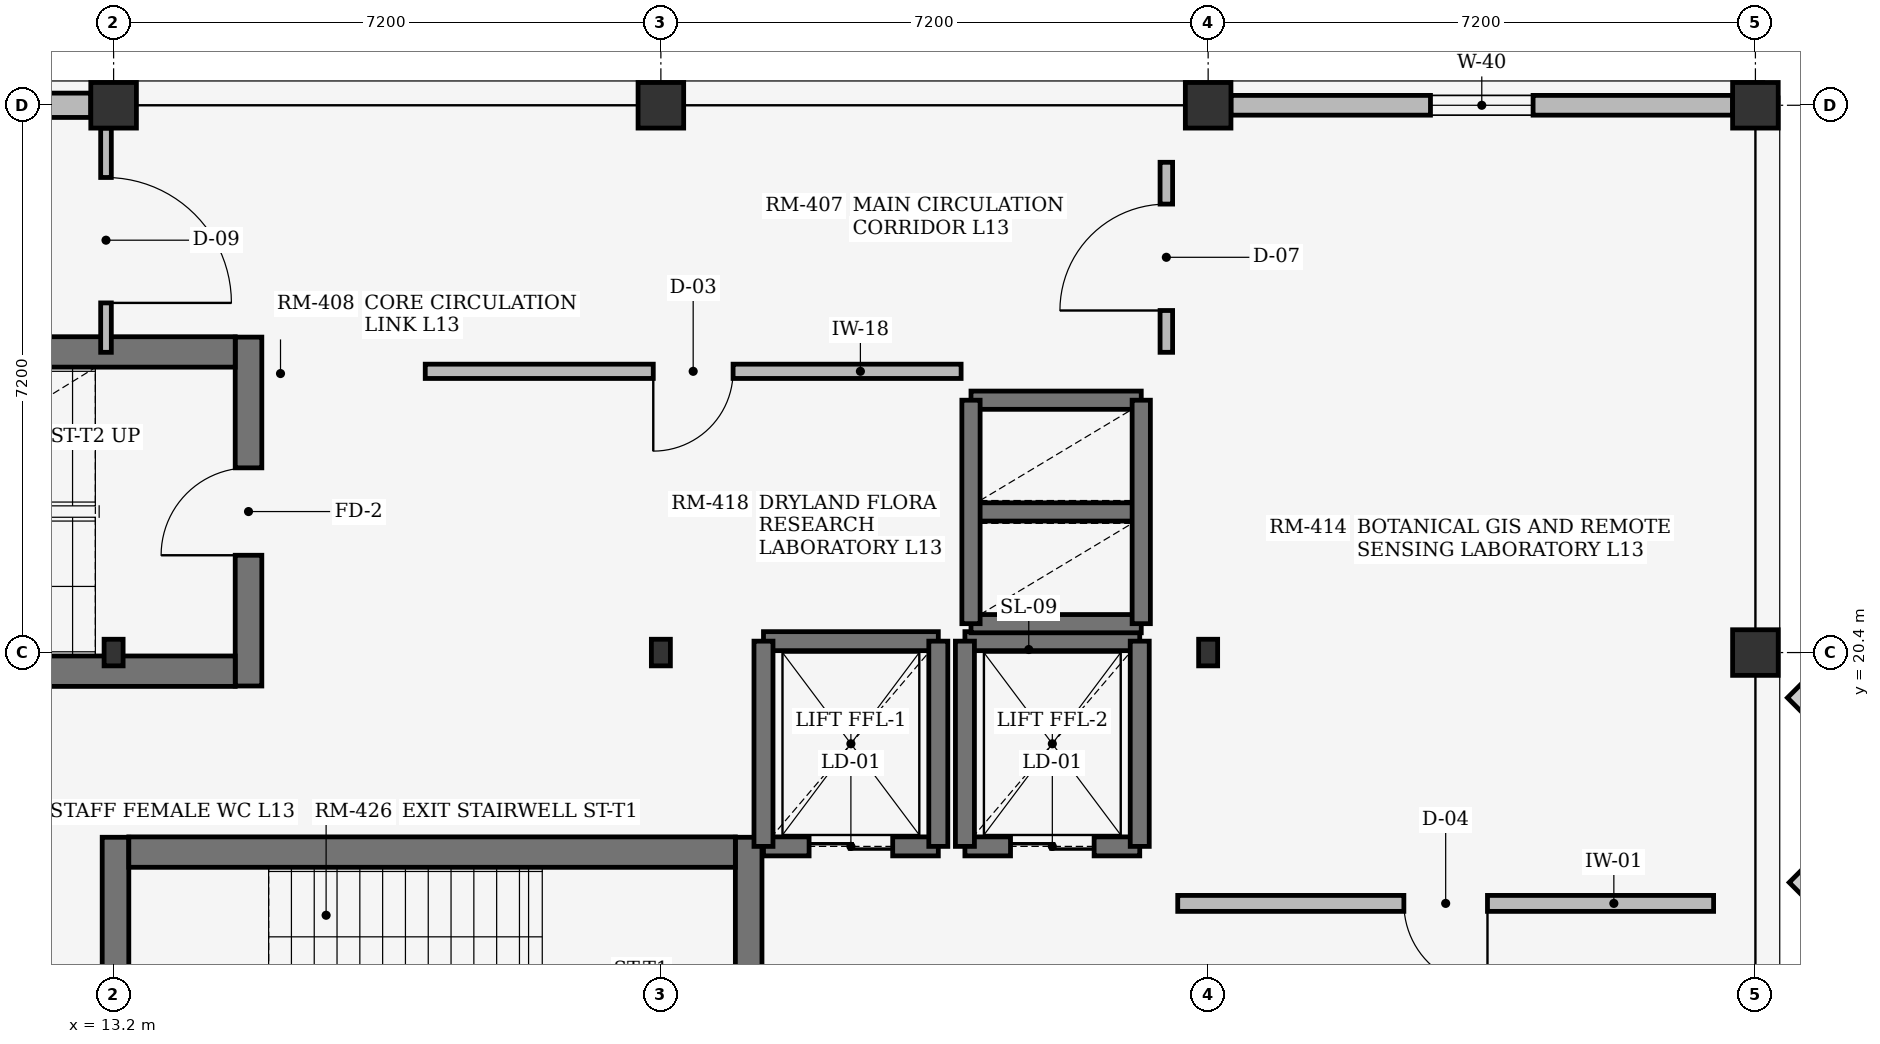
"""IFC4 building model, lengths in metres.
Left out: names, types, materials, properties, quantities, classifications, styles, units other than length and angle.
Written with IfcOpenShell. Run it as: python <this file> out.ifc"""

import sys

from ifc_helpers import new_model, si_unit, direction, frame, frame_2d, origin, origin_2d, place, context, subcontext, project, spatial, rectangle, i_section, extrude, element, fill, save


model = new_model("IFC4")
c1 = context("Model", 3, precision=1e-05, world=origin(), true_north=direction((0.0, 1.0)))
c2 = subcontext(c1, "Body", "Model", "MODEL_VIEW")
j1 = project(units=[si_unit("LENGTHUNIT", "METRE"), si_unit("PLANEANGLEUNIT", "RADIAN")], contexts=[c1])
p1 = place(None, origin())
s1 = spatial("IfcSite", under=j1, at=p1, CompositionType="ELEMENT")
p2 = place(p1, origin())
s2 = spatial("IfcBuilding", under=s1, at=p2, CompositionType="ELEMENT")
p3 = place(p2, frame((0.0, 0.0, 52.2)))
s3 = spatial("IfcBuildingStorey", under=s2, at=p3, CompositionType="ELEMENT", Elevation=52.2)
p4 = place(p3, frame((13.2, 20.4, 0.0), z_axis=(0.0, 0.0, 1.0), x_axis=(1.0, 0.0, 0.0)))
e1 = element("IfcColumn", 1, at=p4, inside=s3, PredefinedType="COLUMN", context=c2, shape_type="SweptSolid", body=[
    extrude(i_section(OverallWidth=0.25, OverallDepth=0.35, WebThickness=0.01, FlangeThickness=0.012, at=origin_2d()), origin(), (0.0, 0.0, 1.0), 3.705),
])
p5 = place(p3, frame((13.2, 27.6, 0.0), z_axis=(0.0, 0.0, 1.0), x_axis=(1.0, 0.0, 0.0)))
e2 = element("IfcColumn", 2, at=p5, inside=s3, PredefinedType="COLUMN", context=c2, shape_type="SweptSolid", body=[
    extrude(rectangle(XDim=0.6, YDim=0.6, at=origin_2d()), origin(), (0.0, 0.0, 1.0), 3.705),
])
p6 = place(p3, frame((20.4, 20.4, 0.0), z_axis=(0.0, 0.0, 1.0), x_axis=(1.0, 0.0, 0.0)))
e3 = element("IfcColumn", 3, at=p6, inside=s3, PredefinedType="COLUMN", context=c2, shape_type="SweptSolid", body=[
    extrude(i_section(OverallWidth=0.25, OverallDepth=0.35, WebThickness=0.01, FlangeThickness=0.012, at=origin_2d()), origin(), (0.0, 0.0, 1.0), 3.705),
])
p7 = place(p3, frame((20.4, 27.6, 0.0), z_axis=(0.0, 0.0, 1.0), x_axis=(1.0, 0.0, 0.0)))
e4 = element("IfcColumn", 4, at=p7, inside=s3, PredefinedType="COLUMN", context=c2, shape_type="SweptSolid", body=[
    extrude(rectangle(XDim=0.6, YDim=0.6, at=origin_2d()), origin(), (0.0, 0.0, 1.0), 3.705),
])
p8 = place(p3, frame((27.6, 20.4, 0.0), z_axis=(0.0, 0.0, 1.0), x_axis=(1.0, 0.0, 0.0)))
e5 = element("IfcColumn", 5, at=p8, inside=s3, PredefinedType="COLUMN", context=c2, shape_type="SweptSolid", body=[
    extrude(i_section(OverallWidth=0.25, OverallDepth=0.35, WebThickness=0.01, FlangeThickness=0.012, at=origin_2d()), origin(), (0.0, 0.0, 1.0), 3.705),
])
for number, where, z_axis, x_axis in (
    (6, (27.6, 27.6, 0.0), (0.0, 0.0, 1.0), (1.0, 0.0, 0.0)),
    (7, (34.8, 20.4, 0.0), (0.0, 0.0, 1.0), (1.0, 0.0, 0.0)),
    (8, (34.8, 27.6, 0.0), (0.0, 0.0, 1.0), (1.0, 0.0, 0.0)),
):
    element("IfcColumn", number, at=place(p3, frame(where, z_axis=z_axis, x_axis=x_axis)), inside=s3, PredefinedType="COLUMN", context=c2, shape_type="SweptSolid", body=[
        extrude(rectangle(XDim=0.6, YDim=0.6, at=origin_2d()), origin(), (0.0, 0.0, 1.0), 3.705),
    ])
p9 = place(p3, frame((6.3, 27.6, 0.0), z_axis=(0.0, 0.0, 1.0), x_axis=(1.0, 0.0, 0.0)))
e9 = element("IfcWall", 9, at=p9, inside=s3, PredefinedType="STANDARD", context=c2, shape_type="SweptSolid", body=[
    extrude(rectangle(XDim=6.6, YDim=0.32, at=frame_2d((3.3, 0.0))), origin(), (0.0, 0.0, 1.0), 3.285),
])
p10 = place(p9, frame((2.15, 0.0, 0.75)))
e10 = element("IfcOpeningElement", 10, at=p10, cuts=e9, PredefinedType="OPENING", context=c2, shape_type="SweptSolid", body=[
    extrude(rectangle(XDim=2.3, YDim=1.35, at=frame_2d((1.15, 0.675))), frame((0.0, 0.17, 0.0), z_axis=(0.0, -1.0, 0.0), x_axis=(1.0, 0.0, 0.0)), (0.0, 0.0, 1.0), 0.34),
])
p11 = place(p3, frame((27.9, 27.6, 0.0), z_axis=(0.0, 0.0, 1.0), x_axis=(1.0, 0.0, 0.0)))
e11 = element("IfcWall", 11, at=p11, inside=s3, PredefinedType="STANDARD", context=c2, shape_type="SweptSolid", body=[
    extrude(rectangle(XDim=6.6, YDim=0.26, at=frame_2d((3.3, 0.0))), origin(), (0.0, 0.0, 1.0), 3.285),
])
p12 = place(p11, frame((2.625, 0.0, 0.75)))
e12 = element("IfcOpeningElement", 12, at=p12, cuts=e11, PredefinedType="OPENING", context=c2, shape_type="SweptSolid", body=[
    extrude(rectangle(XDim=1.35, YDim=1.5, at=frame_2d((0.675, 0.75))), frame((0.0, 0.14, 0.0), z_axis=(0.0, -1.0, 0.0), x_axis=(1.0, 0.0, 0.0)), (0.0, 0.0, 1.0), 0.28),
])
p13 = place(p3, frame((13.225, 13.0, 0.0), z_axis=(0.0, 0.0, 1.0), x_axis=(0.0, 1.0, 0.0)))
e13 = element("IfcWall", 13, at=p13, inside=s3, PredefinedType="SHEAR", context=c2, shape_type="SweptSolid", body=[
    extrude(rectangle(XDim=4.97, YDim=0.35, at=frame_2d((2.485, 0.0))), origin(), (0.0, 0.0, 1.0), 3.705),
])
p14 = place(p13, frame((1.86, 0.0, 0.0)))
e14 = element("IfcOpeningElement", 14, at=p14, cuts=e13, PredefinedType="OPENING", context=c2, shape_type="SweptSolid", body=[
    extrude(rectangle(XDim=1.25, YDim=2.2, at=frame_2d((0.625, 1.1))), frame((0.0, 0.185, 0.0), z_axis=(0.0, -1.0, 0.0), x_axis=(1.0, 0.0, 0.0)), (0.0, 0.0, 1.0), 0.37),
])
p15 = place(p3, frame((21.555, 13.38, 0.0), z_axis=(0.0, 0.0, 1.0), x_axis=(0.0, 1.0, 0.0)))
e15 = element("IfcWall", 15, at=p15, inside=s3, PredefinedType="SHEAR", context=c2, shape_type="SweptSolid", body=[
    extrude(rectangle(XDim=4.59, YDim=0.35, at=frame_2d((2.295, 0.0))), origin(), (0.0, 0.0, 1.0), 3.705),
])
p16 = place(p3, frame((13.4, 17.775, 0.0), z_axis=(0.0, 0.0, 1.0), x_axis=(1.0, 0.0, 0.0)))
e16 = element("IfcWall", 16, at=p16, inside=s3, PredefinedType="SHEAR", context=c2, shape_type="SweptSolid", body=[
    extrude(rectangle(XDim=7.98, YDim=0.4, at=frame_2d((3.99, 0.0))), origin(), (0.0, 0.0, 1.0), 3.705),
])
p17 = place(p3, frame((14.975, 24.55, 0.0), z_axis=(0.0, 0.0, 1.0), x_axis=(0.0, -1.0, 0.0)))
e17 = element("IfcWall", 17, at=p17, inside=s3, PredefinedType="SHEAR", context=c2, shape_type="SweptSolid", body=[
    extrude(rectangle(XDim=4.59, YDim=0.35, at=frame_2d((2.295, 0.0))), origin(), (0.0, 0.0, 1.0), 3.705),
])
p18 = place(p17, frame((1.72, 0.0, 0.0)))
e18 = element("IfcOpeningElement", 18, at=p18, cuts=e17, PredefinedType="OPENING", context=c2, shape_type="SweptSolid", body=[
    extrude(rectangle(XDim=1.15, YDim=2.2, at=frame_2d((0.575, 1.1))), frame((0.0, 0.185, 0.0), z_axis=(0.0, -1.0, 0.0), x_axis=(1.0, 0.0, 0.0)), (0.0, 0.0, 1.0), 0.37),
])
for number, where, z_axis, x_axis in (
    (19, (14.8, 24.355, 0.0), (0.0, 0.0, 1.0), (-1.0, 0.0, 0.0)),
    (20, (14.8, 20.155, 0.0), (0.0, 0.0, 1.0), (-1.0, 0.0, 0.0)),
):
    element("IfcWall", number, at=place(p3, frame(where, z_axis=z_axis, x_axis=x_axis)), inside=s3, PredefinedType="SHEAR", context=c2, shape_type="SweptSolid", body=[
        extrude(rectangle(XDim=7.98, YDim=0.4, at=frame_2d((3.99, 0.0))), origin(), (0.0, 0.0, 1.0), 3.705),
    ])
p19 = place(p3, frame((21.75, 17.85, 0.0), z_axis=(0.0, 0.0, 1.0), x_axis=(1.0, 0.0, 0.0)))
e21 = element("IfcWall", 21, at=p19, inside=s3, PredefinedType="SHEAR", context=c2, shape_type="SweptSolid", body=[
    extrude(rectangle(XDim=2.3, YDim=0.25, at=frame_2d((1.15, 0.0))), origin(), (0.0, 0.0, 1.0), 3.705),
])
p20 = place(p19, frame((0.6, 0.0, 0.0)))
e22 = element("IfcOpeningElement", 22, at=p20, cuts=e21, PredefinedType="OPENING", context=c2, shape_type="SweptSolid", body=[
    extrude(rectangle(XDim=1.1, YDim=2.2, at=frame_2d((0.55, 1.1))), frame((0.0, 0.135, 0.0), z_axis=(0.0, -1.0, 0.0), x_axis=(1.0, 0.0, 0.0)), (0.0, 0.0, 1.0), 0.27),
])
p21 = place(p3, frame((21.75, 20.55, 0.0), z_axis=(0.0, 0.0, 1.0), x_axis=(1.0, 0.0, 0.0)))
e23 = element("IfcWall", 23, at=p21, inside=s3, PredefinedType="SHEAR", context=c2, shape_type="SweptSolid", body=[
    extrude(rectangle(XDim=2.3, YDim=0.25, at=frame_2d((1.15, 0.0))), origin(), (0.0, 0.0, 1.0), 3.705),
])
for number, where, z_axis, x_axis in (
    (24, (21.75, 17.85, 0.0), (0.0, 0.0, 1.0), (0.0, 1.0, 0.0)),
    (25, (24.05, 17.85, 0.0), (0.0, 0.0, 1.0), (0.0, 1.0, 0.0)),
):
    element("IfcWall", number, at=place(p3, frame(where, z_axis=z_axis, x_axis=x_axis)), inside=s3, PredefinedType="SHEAR", context=c2, shape_type="SweptSolid", body=[
        extrude(rectangle(XDim=2.7, YDim=0.25, at=frame_2d((1.35, 0.0))), origin(), (0.0, 0.0, 1.0), 3.705),
    ])
p22 = place(p3, frame((24.4, 17.85, 0.0), z_axis=(0.0, 0.0, 1.0), x_axis=(1.0, 0.0, 0.0)))
e26 = element("IfcWall", 26, at=p22, inside=s3, PredefinedType="SHEAR", context=c2, shape_type="SweptSolid", body=[
    extrude(rectangle(XDim=2.3, YDim=0.25, at=frame_2d((1.15, 0.0))), origin(), (0.0, 0.0, 1.0), 3.705),
])
p23 = place(p22, frame((0.6, 0.0, 0.0)))
e27 = element("IfcOpeningElement", 27, at=p23, cuts=e26, PredefinedType="OPENING", context=c2, shape_type="SweptSolid", body=[
    extrude(rectangle(XDim=1.1, YDim=2.2, at=frame_2d((0.55, 1.1))), frame((0.0, 0.135, 0.0), z_axis=(0.0, -1.0, 0.0), x_axis=(1.0, 0.0, 0.0)), (0.0, 0.0, 1.0), 0.27),
])
p24 = place(p3, frame((24.4, 20.55, 0.0), z_axis=(0.0, 0.0, 1.0), x_axis=(1.0, 0.0, 0.0)))
e28 = element("IfcWall", 28, at=p24, inside=s3, PredefinedType="SHEAR", context=c2, shape_type="SweptSolid", body=[
    extrude(rectangle(XDim=2.3, YDim=0.25, at=frame_2d((1.15, 0.0))), origin(), (0.0, 0.0, 1.0), 3.705),
])
for number, where, z_axis, x_axis in (
    (29, (24.4, 17.85, 0.0), (0.0, 0.0, 1.0), (0.0, 1.0, 0.0)),
    (30, (26.7, 17.85, 0.0), (0.0, 0.0, 1.0), (0.0, 1.0, 0.0)),
):
    element("IfcWall", number, at=place(p3, frame(where, z_axis=z_axis, x_axis=x_axis)), inside=s3, PredefinedType="SHEAR", context=c2, shape_type="SweptSolid", body=[
        extrude(rectangle(XDim=2.7, YDim=0.25, at=frame_2d((1.35, 0.0))), origin(), (0.0, 0.0, 1.0), 3.705),
    ])
for number, where, z_axis, x_axis in (
    (31, (24.48, 20.78, 0.0), (0.0, 0.0, 1.0), (1.0, 0.0, 0.0)),
    (32, (24.48, 22.25, 0.0), (0.0, 0.0, 1.0), (1.0, 0.0, 0.0)),
    (33, (24.48, 23.72, 0.0), (0.0, 0.0, 1.0), (1.0, 0.0, 0.0)),
):
    element("IfcWall", number, at=place(p3, frame(where, z_axis=z_axis, x_axis=x_axis)), inside=s3, PredefinedType="SHEAR", context=c2, shape_type="SweptSolid", body=[
        extrude(rectangle(XDim=2.24, YDim=0.24, at=frame_2d((1.12, 0.0))), origin(), (0.0, 0.0, 1.0), 3.705),
    ])
for number, where, z_axis, x_axis in (
    (34, (24.48, 20.78, 0.0), (0.0, 0.0, 1.0), (0.0, 1.0, 0.0)),
    (35, (26.72, 20.78, 0.0), (0.0, 0.0, 1.0), (0.0, 1.0, 0.0)),
):
    element("IfcWall", number, at=place(p3, frame(where, z_axis=z_axis, x_axis=x_axis)), inside=s3, PredefinedType="SHEAR", context=c2, shape_type="SweptSolid", body=[
        extrude(rectangle(XDim=2.94, YDim=0.24, at=frame_2d((1.47, 0.0))), origin(), (0.0, 0.0, 1.0), 3.705),
    ])
p25 = place(p3, frame((17.3, 24.1, 0.0), z_axis=(0.0, 0.0, 1.0), x_axis=(1.0, 0.0, 0.0)))
e36 = element("IfcWall", 36, at=p25, inside=s3, PredefinedType="PARTITIONING", context=c2, shape_type="SweptSolid", body=[
    extrude(rectangle(XDim=7.05, YDim=0.188, at=frame_2d((3.525, 0.0))), origin(), (0.0, 0.0, 1.0), 3.685),
])
p26 = place(p25, frame((3.0, 0.0, 0.0)))
e37 = element("IfcOpeningElement", 37, at=p26, cuts=e36, PredefinedType="OPENING", context=c2, shape_type="SweptSolid", body=[
    extrude(rectangle(XDim=1.05, YDim=2.15, at=frame_2d((0.525, 1.075))), frame((0.0, 0.104, 0.0), z_axis=(0.0, -1.0, 0.0), x_axis=(1.0, 0.0, 0.0)), (0.0, 0.0, 1.0), 0.208),
])
p27 = place(p3, frame((27.2, 17.1, 0.0), z_axis=(0.0, 0.0, 1.0), x_axis=(1.0, 0.0, 0.0)))
e38 = element("IfcWall", 38, at=p27, inside=s3, PredefinedType="PARTITIONING", context=c2, shape_type="SweptSolid", body=[
    extrude(rectangle(XDim=7.05, YDim=0.21, at=frame_2d((3.525, 0.0))), origin(), (0.0, 0.0, 1.0), 3.685),
])
p28 = place(p27, frame((2.975, 0.0, 0.0)))
e39 = element("IfcOpeningElement", 39, at=p28, cuts=e38, PredefinedType="OPENING", context=c2, shape_type="SweptSolid", body=[
    extrude(rectangle(XDim=1.1, YDim=2.2, at=frame_2d((0.55, 1.1))), frame((0.0, 0.115, 0.0), z_axis=(0.0, -1.0, 0.0), x_axis=(1.0, 0.0, 0.0)), (0.0, 0.0, 1.0), 0.23),
])
p29 = place(p3, frame((27.05, 24.35, 0.0), z_axis=(0.0, 0.0, 1.0), x_axis=(0.0, 1.0, 0.0)))
e40 = element("IfcWall", 40, at=p29, inside=s3, PredefinedType="PARTITIONING", context=c2, shape_type="SweptSolid", body=[
    extrude(rectangle(XDim=2.5, YDim=0.165, at=frame_2d((1.25, 0.0))), origin(), (0.0, 0.0, 1.0), 3.685),
])
p30 = place(p29, frame((0.55, 0.0, 0.0)))
e41 = element("IfcOpeningElement", 41, at=p30, cuts=e40, PredefinedType="OPENING", context=c2, shape_type="SweptSolid", body=[
    extrude(rectangle(XDim=1.4, YDim=2.25, at=frame_2d((0.7, 1.125))), frame((0.0, 0.093, 0.0), z_axis=(0.0, -1.0, 0.0), x_axis=(1.0, 0.0, 0.0)), (0.0, 0.0, 1.0), 0.185),
])
p31 = place(p3, frame((13.1, 24.35, 0.0), z_axis=(0.0, 0.0, 1.0), x_axis=(0.0, 1.0, 0.0)))
e42 = element("IfcWall", 42, at=p31, inside=s3, PredefinedType="PARTITIONING", context=c2, shape_type="SweptSolid", body=[
    extrude(rectangle(XDim=2.95, YDim=0.14, at=frame_2d((1.475, 0.0))), origin(), (0.0, 0.0, 1.0), 3.295),
])
p32 = place(p31, frame((0.65, 0.0, 0.0)))
e43 = element("IfcOpeningElement", 43, at=p32, cuts=e42, PredefinedType="OPENING", context=c2, shape_type="SweptSolid", body=[
    extrude(rectangle(XDim=1.65, YDim=2.25, at=frame_2d((0.825, 1.125))), frame((0.0, 0.08, 0.0), z_axis=(0.0, -1.0, 0.0), x_axis=(1.0, 0.0, 0.0)), (0.0, 0.0, 1.0), 0.16),
])
p33 = place(p12, origin())
e44 = element("IfcWindow", 44, at=p33, inside=s3, PartitioningType="SINGLE_PANEL", PredefinedType="WINDOW", context=c2, shape_type="SweptSolid", body=[
    extrude(rectangle(XDim=1.35, YDim=1.5, at=frame_2d((0.675, 0.75))), frame((0.0, 0.03, 0.0), z_axis=(0.0, -1.0, 0.0), x_axis=(1.0, 0.0, 0.0)), (0.0, 0.0, 1.0), 0.06),
])
fill(e12, e44)
p34 = place(p18, origin())
e45 = element("IfcDoor", 45, at=p34, inside=s3, OperationType="SINGLE_SWING_RIGHT", PredefinedType="DOOR", context=c2, shape_type="SweptSolid", body=[
    extrude(rectangle(XDim=1.15, YDim=2.2, at=frame_2d((0.575, 1.1))), frame((0.0, 0.025, 0.0), z_axis=(0.0, -1.0, 0.0), x_axis=(1.0, 0.0, 0.0)), (0.0, 0.0, 1.0), 0.05),
])
fill(e18, e45)
p35 = place(p20, origin())
e46 = element("IfcDoor", 46, at=p35, inside=s3, OperationType="DOUBLE_DOOR_SLIDING", PredefinedType="DOOR", context=c2, shape_type="SweptSolid", body=[
    extrude(rectangle(XDim=1.1, YDim=2.2, at=frame_2d((0.55, 1.1))), frame((0.0, 0.025, 0.0), z_axis=(0.0, -1.0, 0.0), x_axis=(1.0, 0.0, 0.0)), (0.0, 0.0, 1.0), 0.05),
])
fill(e22, e46)
p36 = place(p23, origin())
e47 = element("IfcDoor", 47, at=p36, inside=s3, OperationType="DOUBLE_DOOR_SLIDING", PredefinedType="DOOR", context=c2, shape_type="SweptSolid", body=[
    extrude(rectangle(XDim=1.1, YDim=2.2, at=frame_2d((0.55, 1.1))), frame((0.0, 0.025, 0.0), z_axis=(0.0, -1.0, 0.0), x_axis=(1.0, 0.0, 0.0)), (0.0, 0.0, 1.0), 0.05),
])
fill(e27, e47)
p37 = place(p26, frame((1.05, 0.0, 0.0), z_axis=(0.0, 0.0, 1.0), x_axis=(-1.0, 0.0, 0.0)))
e48 = element("IfcDoor", 48, at=p37, inside=s3, OperationType="SINGLE_SWING_LEFT", PredefinedType="DOOR", context=c2, shape_type="SweptSolid", body=[
    extrude(rectangle(XDim=1.05, YDim=2.15, at=frame_2d((0.525, 1.075))), frame((0.0, 0.025, 0.0), z_axis=(0.0, -1.0, 0.0), x_axis=(1.0, 0.0, 0.0)), (0.0, 0.0, 1.0), 0.05),
])
fill(e37, e48)
p38 = place(p28, origin())
e49 = element("IfcDoor", 49, at=p38, inside=s3, OperationType="SINGLE_SWING_RIGHT", PredefinedType="DOOR", context=c2, shape_type="SweptSolid", body=[
    extrude(rectangle(XDim=1.1, YDim=2.2, at=frame_2d((0.55, 1.1))), frame((0.0, 0.025, 0.0), z_axis=(0.0, -1.0, 0.0), x_axis=(1.0, 0.0, 0.0)), (0.0, 0.0, 1.0), 0.05),
])
fill(e39, e49)
p39 = place(p30, origin())
e50 = element("IfcDoor", 50, at=p39, inside=s3, OperationType="SINGLE_SWING_LEFT", PredefinedType="DOOR", context=c2, shape_type="SweptSolid", body=[
    extrude(rectangle(XDim=1.4, YDim=2.25, at=frame_2d((0.7, 1.125))), frame((0.0, 0.025, 0.0), z_axis=(0.0, -1.0, 0.0), x_axis=(1.0, 0.0, 0.0)), (0.0, 0.0, 1.0), 0.05),
])
fill(e41, e50)
p40 = place(p32, frame((1.65, 0.0, 0.0), z_axis=(0.0, 0.0, 1.0), x_axis=(-1.0, 0.0, 0.0)))
e51 = element("IfcDoor", 51, at=p40, inside=s3, OperationType="DOUBLE_DOOR_SINGLE_SWING", PredefinedType="DOOR", context=c2, shape_type="SweptSolid", body=[
    extrude(rectangle(XDim=1.65, YDim=2.25, at=frame_2d((0.825, 1.125))), frame((0.0, 0.025, 0.0), z_axis=(0.0, -1.0, 0.0), x_axis=(1.0, 0.0, 0.0)), (0.0, 0.0, 1.0), 0.05),
])
fill(e43, e51)
save(model, sys.argv[1])
